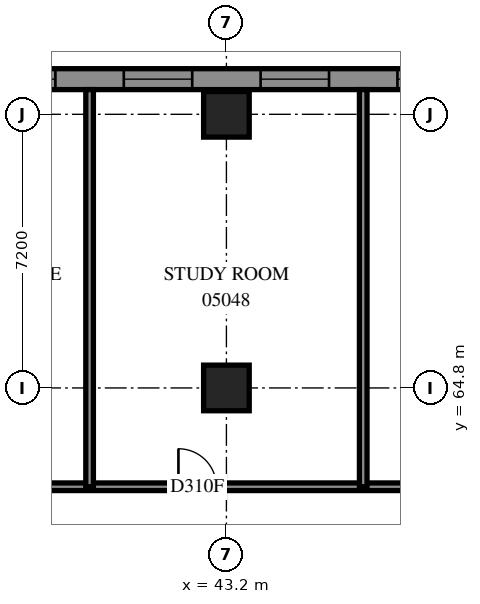
"""IFC4 building model, lengths in metres.
Left out: names, types, materials, properties, quantities, classifications, styles, units other than length and angle.
Written with IfcOpenShell. Run it as: python <this file> out.ifc"""

import sys

from ifc_helpers import new_model, si_unit, direction, frame, frame_2d, origin, origin_2d, place, context, subcontext, project, spatial, polyline, rectangle, outline, extrude, element, fill, save


model = new_model("IFC4")
c1 = context("Model", 3, precision=1e-05, world=origin(), true_north=direction((0.0, 1.0)))
c2 = subcontext(c1, "Body", "Model", "MODEL_VIEW")
j1 = project(units=[si_unit("LENGTHUNIT", "METRE"), si_unit("PLANEANGLEUNIT", "RADIAN")], contexts=[c1])
p1 = place(None, origin())
s1 = spatial("IfcSite", under=j1, at=p1, CompositionType="ELEMENT")
p2 = place(p1, origin())
s2 = spatial("IfcBuilding", under=s1, at=p2, CompositionType="ELEMENT")
p3 = place(p2, frame((0.0, 0.0, 22.8)))
s3 = spatial("IfcBuildingStorey", under=s2, at=p3, CompositionType="ELEMENT", Elevation=22.8)
for number, where, z_axis, x_axis in (
    (1, (43.2, 64.8, 0.0), (0.0, 0.0, 1.0), (1.0, 0.0, 0.0)),
    (2, (43.2, 72.0, 0.0), (0.0, 0.0, 1.0), (1.0, 0.0, 0.0)),
):
    element("IfcColumn", number, at=place(p3, frame(where, z_axis=z_axis, x_axis=x_axis)), inside=s3, PredefinedType="COLUMN", context=c2, shape_type="SweptSolid", body=[
        extrude(rectangle(XDim=1.2, YDim=1.2, at=origin_2d()), origin(), (0.0, 0.0, 1.0), 3.9),
    ])
p4 = place(p3, frame((79.583, 72.925, 0.0), z_axis=(0.0, 0.0, 1.0), x_axis=(-1.0, 0.0, 0.0)))
e3 = element("IfcWall", 3, at=p4, inside=s3, PredefinedType="SOLIDWALL", context=c2, shape_type="SweptSolid", body=[
    extrude(outline(polyline([(-0.114, -0.275), (79.583, -0.275), (79.033, 0.275), (0.114, 0.275), (-0.114, -0.275)])), origin(), (0.0, 0.0, 1.0), 3.9),
])
p5 = place(p4, frame((1.249, 0.0, 0.7)))
e4 = element("IfcOpeningElement", 4, at=p5, cuts=e3, PredefinedType="OPENING", context=c2, shape_type="SweptSolid", body=[
    extrude(rectangle(XDim=1.8, YDim=2.4, at=frame_2d((0.9, 1.2))), frame((0.0, 0.285, 0.0), z_axis=(0.0, -1.0, 0.0), x_axis=(1.0, 0.0, 0.0)), (0.0, 0.0, 1.0), 0.57),
])
p6 = place(p4, frame((4.883, 0.0, 0.7)))
e5 = element("IfcOpeningElement", 5, at=p6, cuts=e3, PredefinedType="OPENING", context=c2, shape_type="SweptSolid", body=[
    extrude(rectangle(XDim=1.8, YDim=2.4, at=frame_2d((0.9, 1.2))), frame((0.0, 0.285, 0.0), z_axis=(0.0, -1.0, 0.0), x_axis=(1.0, 0.0, 0.0)), (0.0, 0.0, 1.0), 0.57),
])
p7 = place(p4, frame((8.483, 0.0, 0.7)))
e6 = element("IfcOpeningElement", 6, at=p7, cuts=e3, PredefinedType="OPENING", context=c2, shape_type="SweptSolid", body=[
    extrude(rectangle(XDim=1.8, YDim=2.4, at=frame_2d((0.9, 1.2))), frame((0.0, 0.285, 0.0), z_axis=(0.0, -1.0, 0.0), x_axis=(1.0, 0.0, 0.0)), (0.0, 0.0, 1.0), 0.57),
])
p8 = place(p4, frame((12.083, 0.0, 0.7)))
e7 = element("IfcOpeningElement", 7, at=p8, cuts=e3, PredefinedType="OPENING", context=c2, shape_type="SweptSolid", body=[
    extrude(rectangle(XDim=1.8, YDim=2.4, at=frame_2d((0.9, 1.2))), frame((0.0, 0.285, 0.0), z_axis=(0.0, -1.0, 0.0), x_axis=(1.0, 0.0, 0.0)), (0.0, 0.0, 1.0), 0.57),
])
p9 = place(p4, frame((15.683, 0.0, 0.7)))
e8 = element("IfcOpeningElement", 8, at=p9, cuts=e3, PredefinedType="OPENING", context=c2, shape_type="SweptSolid", body=[
    extrude(rectangle(XDim=1.8, YDim=2.4, at=frame_2d((0.9, 1.2))), frame((0.0, 0.285, 0.0), z_axis=(0.0, -1.0, 0.0), x_axis=(1.0, 0.0, 0.0)), (0.0, 0.0, 1.0), 0.57),
])
p10 = place(p4, frame((19.283, 0.0, 0.7)))
e9 = element("IfcOpeningElement", 9, at=p10, cuts=e3, PredefinedType="OPENING", context=c2, shape_type="SweptSolid", body=[
    extrude(rectangle(XDim=1.8, YDim=2.4, at=frame_2d((0.9, 1.2))), frame((0.0, 0.285, 0.0), z_axis=(0.0, -1.0, 0.0), x_axis=(1.0, 0.0, 0.0)), (0.0, 0.0, 1.0), 0.57),
])
p11 = place(p4, frame((22.883, 0.0, 0.7)))
e10 = element("IfcOpeningElement", 10, at=p11, cuts=e3, PredefinedType="OPENING", context=c2, shape_type="SweptSolid", body=[
    extrude(rectangle(XDim=1.8, YDim=2.4, at=frame_2d((0.9, 1.2))), frame((0.0, 0.285, 0.0), z_axis=(0.0, -1.0, 0.0), x_axis=(1.0, 0.0, 0.0)), (0.0, 0.0, 1.0), 0.57),
])
p12 = place(p4, frame((26.483, 0.0, 0.7)))
e11 = element("IfcOpeningElement", 11, at=p12, cuts=e3, PredefinedType="OPENING", context=c2, shape_type="SweptSolid", body=[
    extrude(rectangle(XDim=1.8, YDim=2.4, at=frame_2d((0.9, 1.2))), frame((0.0, 0.285, 0.0), z_axis=(0.0, -1.0, 0.0), x_axis=(1.0, 0.0, 0.0)), (0.0, 0.0, 1.0), 0.57),
])
p13 = place(p4, frame((30.083, 0.0, 0.7)))
e12 = element("IfcOpeningElement", 12, at=p13, cuts=e3, PredefinedType="OPENING", context=c2, shape_type="SweptSolid", body=[
    extrude(rectangle(XDim=1.8, YDim=2.4, at=frame_2d((0.9, 1.2))), frame((0.0, 0.285, 0.0), z_axis=(0.0, -1.0, 0.0), x_axis=(1.0, 0.0, 0.0)), (0.0, 0.0, 1.0), 0.57),
])
p14 = place(p4, frame((33.683, 0.0, 0.7)))
e13 = element("IfcOpeningElement", 13, at=p14, cuts=e3, PredefinedType="OPENING", context=c2, shape_type="SweptSolid", body=[
    extrude(rectangle(XDim=1.8, YDim=2.4, at=frame_2d((0.9, 1.2))), frame((0.0, 0.285, 0.0), z_axis=(0.0, -1.0, 0.0), x_axis=(1.0, 0.0, 0.0)), (0.0, 0.0, 1.0), 0.57),
])
p15 = place(p4, frame((37.283, 0.0, 0.7)))
e14 = element("IfcOpeningElement", 14, at=p15, cuts=e3, PredefinedType="OPENING", context=c2, shape_type="SweptSolid", body=[
    extrude(rectangle(XDim=1.8, YDim=2.4, at=frame_2d((0.9, 1.2))), frame((0.0, 0.285, 0.0), z_axis=(0.0, -1.0, 0.0), x_axis=(1.0, 0.0, 0.0)), (0.0, 0.0, 1.0), 0.57),
])
p16 = place(p4, frame((40.883, 0.0, 0.7)))
e15 = element("IfcOpeningElement", 15, at=p16, cuts=e3, PredefinedType="OPENING", context=c2, shape_type="SweptSolid", body=[
    extrude(rectangle(XDim=1.8, YDim=2.4, at=frame_2d((0.9, 1.2))), frame((0.0, 0.285, 0.0), z_axis=(0.0, -1.0, 0.0), x_axis=(1.0, 0.0, 0.0)), (0.0, 0.0, 1.0), 0.57),
])
p17 = place(p4, frame((44.483, 0.0, 0.7)))
e16 = element("IfcOpeningElement", 16, at=p17, cuts=e3, PredefinedType="OPENING", context=c2, shape_type="SweptSolid", body=[
    extrude(rectangle(XDim=1.8, YDim=2.4, at=frame_2d((0.9, 1.2))), frame((0.0, 0.285, 0.0), z_axis=(0.0, -1.0, 0.0), x_axis=(1.0, 0.0, 0.0)), (0.0, 0.0, 1.0), 0.57),
])
p18 = place(p4, frame((48.083, 0.0, 0.7)))
e17 = element("IfcOpeningElement", 17, at=p18, cuts=e3, PredefinedType="OPENING", context=c2, shape_type="SweptSolid", body=[
    extrude(rectangle(XDim=1.8, YDim=2.4, at=frame_2d((0.9, 1.2))), frame((0.0, 0.285, 0.0), z_axis=(0.0, -1.0, 0.0), x_axis=(1.0, 0.0, 0.0)), (0.0, 0.0, 1.0), 0.57),
])
p19 = place(p4, frame((51.683, 0.0, 0.7)))
e18 = element("IfcOpeningElement", 18, at=p19, cuts=e3, PredefinedType="OPENING", context=c2, shape_type="SweptSolid", body=[
    extrude(rectangle(XDim=1.8, YDim=2.4, at=frame_2d((0.9, 1.2))), frame((0.0, 0.285, 0.0), z_axis=(0.0, -1.0, 0.0), x_axis=(1.0, 0.0, 0.0)), (0.0, 0.0, 1.0), 0.57),
])
p20 = place(p4, frame((55.283, 0.0, 0.7)))
e19 = element("IfcOpeningElement", 19, at=p20, cuts=e3, PredefinedType="OPENING", context=c2, shape_type="SweptSolid", body=[
    extrude(rectangle(XDim=1.8, YDim=2.4, at=frame_2d((0.9, 1.2))), frame((0.0, 0.285, 0.0), z_axis=(0.0, -1.0, 0.0), x_axis=(1.0, 0.0, 0.0)), (0.0, 0.0, 1.0), 0.57),
])
p21 = place(p4, frame((58.883, 0.0, 0.7)))
e20 = element("IfcOpeningElement", 20, at=p21, cuts=e3, PredefinedType="OPENING", context=c2, shape_type="SweptSolid", body=[
    extrude(rectangle(XDim=1.8, YDim=2.4, at=frame_2d((0.9, 1.2))), frame((0.0, 0.285, 0.0), z_axis=(0.0, -1.0, 0.0), x_axis=(1.0, 0.0, 0.0)), (0.0, 0.0, 1.0), 0.57),
])
p22 = place(p4, frame((62.483, 0.0, 0.7)))
e21 = element("IfcOpeningElement", 21, at=p22, cuts=e3, PredefinedType="OPENING", context=c2, shape_type="SweptSolid", body=[
    extrude(rectangle(XDim=1.8, YDim=2.4, at=frame_2d((0.9, 1.2))), frame((0.0, 0.285, 0.0), z_axis=(0.0, -1.0, 0.0), x_axis=(1.0, 0.0, 0.0)), (0.0, 0.0, 1.0), 0.57),
])
p23 = place(p4, frame((66.083, 0.0, 0.7)))
e22 = element("IfcOpeningElement", 22, at=p23, cuts=e3, PredefinedType="OPENING", context=c2, shape_type="SweptSolid", body=[
    extrude(rectangle(XDim=1.8, YDim=2.4, at=frame_2d((0.9, 1.2))), frame((0.0, 0.285, 0.0), z_axis=(0.0, -1.0, 0.0), x_axis=(1.0, 0.0, 0.0)), (0.0, 0.0, 1.0), 0.57),
])
p24 = place(p4, frame((69.683, 0.0, 0.7)))
e23 = element("IfcOpeningElement", 23, at=p24, cuts=e3, PredefinedType="OPENING", context=c2, shape_type="SweptSolid", body=[
    extrude(rectangle(XDim=1.8, YDim=2.4, at=frame_2d((0.9, 1.2))), frame((0.0, 0.285, 0.0), z_axis=(0.0, -1.0, 0.0), x_axis=(1.0, 0.0, 0.0)), (0.0, 0.0, 1.0), 0.57),
])
p25 = place(p4, frame((73.683, 0.0, 0.7)))
e24 = element("IfcOpeningElement", 24, at=p25, cuts=e3, PredefinedType="OPENING", context=c2, shape_type="SweptSolid", body=[
    extrude(rectangle(XDim=1.8, YDim=2.4, at=frame_2d((0.9, 1.2))), frame((0.0, 0.285, 0.0), z_axis=(0.0, -1.0, 0.0), x_axis=(1.0, 0.0, 0.0)), (0.0, 0.0, 1.0), 0.57),
])
p26 = place(p4, frame((76.508, 0.0, 0.7)))
e25 = element("IfcOpeningElement", 25, at=p26, cuts=e3, PredefinedType="OPENING", context=c2, shape_type="SweptSolid", body=[
    extrude(rectangle(XDim=1.8, YDim=2.4, at=frame_2d((0.9, 1.2))), frame((0.0, 0.285, 0.0), z_axis=(0.0, -1.0, 0.0), x_axis=(1.0, 0.0, 0.0)), (0.0, 0.0, 1.0), 0.57),
])
p27 = place(p3, frame((0.002, 62.2, 0.0), z_axis=(0.0, 0.0, 1.0), x_axis=(1.0, 0.0, 0.0)))
e26 = element("IfcWall", 26, at=p27, inside=s3, PredefinedType="PARTITIONING", context=c2, shape_type="SweptSolid", body=[
    extrude(rectangle(XDim=54.598, YDim=0.2, at=frame_2d((27.299, 0.0))), origin(), (0.0, 0.0, 1.0), 3.9),
])
p28 = place(p27, frame((8.667, 0.0, 0.0)))
e27 = element("IfcOpeningElement", 27, at=p28, cuts=e26, PredefinedType="OPENING", context=c2, shape_type="SweptSolid", body=[
    extrude(rectangle(XDim=1.0, YDim=2.1, at=frame_2d((0.5, 1.05))), frame((0.0, 0.11, 0.0), z_axis=(0.0, -1.0, 0.0), x_axis=(1.0, 0.0, 0.0)), (0.0, 0.0, 1.0), 0.22),
])
p29 = place(p27, frame((13.136, 0.0, 0.0)))
e28 = element("IfcOpeningElement", 28, at=p29, cuts=e26, PredefinedType="OPENING", context=c2, shape_type="SweptSolid", body=[
    extrude(rectangle(XDim=1.0, YDim=2.1, at=frame_2d((0.5, 1.05))), frame((0.0, 0.11, 0.0), z_axis=(0.0, -1.0, 0.0), x_axis=(1.0, 0.0, 0.0)), (0.0, 0.0, 1.0), 0.22),
])
p30 = place(p27, frame((20.335, 0.0, 0.0)))
e29 = element("IfcOpeningElement", 29, at=p30, cuts=e26, PredefinedType="OPENING", context=c2, shape_type="SweptSolid", body=[
    extrude(rectangle(XDim=1.0, YDim=2.1, at=frame_2d((0.5, 1.05))), frame((0.0, 0.11, 0.0), z_axis=(0.0, -1.0, 0.0), x_axis=(1.0, 0.0, 0.0)), (0.0, 0.0, 1.0), 0.22),
])
p31 = place(p27, frame((27.535, 0.0, 0.0)))
e30 = element("IfcOpeningElement", 30, at=p31, cuts=e26, PredefinedType="OPENING", context=c2, shape_type="SweptSolid", body=[
    extrude(rectangle(XDim=1.0, YDim=2.1, at=frame_2d((0.5, 1.05))), frame((0.0, 0.11, 0.0), z_axis=(0.0, -1.0, 0.0), x_axis=(1.0, 0.0, 0.0)), (0.0, 0.0, 1.0), 0.22),
])
p32 = place(p27, frame((34.736, 0.0, 0.0)))
e31 = element("IfcOpeningElement", 31, at=p32, cuts=e26, PredefinedType="OPENING", context=c2, shape_type="SweptSolid", body=[
    extrude(rectangle(XDim=1.0, YDim=2.1, at=frame_2d((0.5, 1.05))), frame((0.0, 0.11, 0.0), z_axis=(0.0, -1.0, 0.0), x_axis=(1.0, 0.0, 0.0)), (0.0, 0.0, 1.0), 0.22),
])
p33 = place(p27, frame((41.935, 0.0, 0.0)))
e32 = element("IfcOpeningElement", 32, at=p33, cuts=e26, PredefinedType="OPENING", context=c2, shape_type="SweptSolid", body=[
    extrude(rectangle(XDim=1.0, YDim=2.1, at=frame_2d((0.5, 1.05))), frame((0.0, 0.11, 0.0), z_axis=(0.0, -1.0, 0.0), x_axis=(1.0, 0.0, 0.0)), (0.0, 0.0, 1.0), 0.22),
])
p34 = place(p27, frame((49.136, 0.0, 0.0)))
e33 = element("IfcOpeningElement", 33, at=p34, cuts=e26, PredefinedType="OPENING", context=c2, shape_type="SweptSolid", body=[
    extrude(rectangle(XDim=1.0, YDim=2.1, at=frame_2d((0.5, 1.05))), frame((0.0, 0.11, 0.0), z_axis=(0.0, -1.0, 0.0), x_axis=(1.0, 0.0, 0.0)), (0.0, 0.0, 1.0), 0.22),
])
p35 = place(p27, frame((4.803, 0.0, 0.0)))
e34 = element("IfcOpeningElement", 34, at=p35, cuts=e26, PredefinedType="OPENING", context=c2, shape_type="SweptSolid", body=[
    extrude(rectangle(XDim=1.0, YDim=2.1, at=frame_2d((0.5, 1.05))), frame((0.0, 0.11, 0.0), z_axis=(0.0, -1.0, 0.0), x_axis=(1.0, 0.0, 0.0)), (0.0, 0.0, 1.0), 0.22),
])
for number, where, z_axis, x_axis in (
    (35, (39.6, 62.2, 0.0), (0.0, 0.0, 1.0), (0.0, 1.0, 0.0)),
    (36, (46.8, 62.2, 0.0), (0.0, 0.0, 1.0), (0.0, 1.0, 0.0)),
):
    element("IfcWall", number, at=place(p3, frame(where, z_axis=z_axis, x_axis=x_axis)), inside=s3, PredefinedType="PARTITIONING", context=c2, shape_type="SweptSolid", body=[
        extrude(rectangle(XDim=10.45, YDim=0.2, at=frame_2d((5.225, 0.0))), origin(), (0.0, 0.0, 1.0), 3.9),
    ])
p36 = place(p13, origin())
e37 = element("IfcWindow", 37, at=p36, inside=s3, PartitioningType="SINGLE_PANEL", PredefinedType="WINDOW", context=c2, shape_type="SweptSolid", body=[
    extrude(rectangle(XDim=1.8, YDim=2.4, at=frame_2d((0.9, 1.2))), frame((0.0, 0.155, 0.0), z_axis=(0.0, -1.0, 0.0), x_axis=(1.0, 0.0, 0.0)), (0.0, 0.0, 1.0), 0.06),
])
fill(e12, e37)
p37 = place(p14, origin())
e38 = element("IfcWindow", 38, at=p37, inside=s3, PartitioningType="SINGLE_PANEL", PredefinedType="WINDOW", context=c2, shape_type="SweptSolid", body=[
    extrude(rectangle(XDim=1.8, YDim=2.4, at=frame_2d((0.9, 1.2))), frame((0.0, 0.155, 0.0), z_axis=(0.0, -1.0, 0.0), x_axis=(1.0, 0.0, 0.0)), (0.0, 0.0, 1.0), 0.06),
])
fill(e13, e38)
p38 = place(p15, origin())
e39 = element("IfcWindow", 39, at=p38, inside=s3, PartitioningType="SINGLE_PANEL", PredefinedType="WINDOW", context=c2, shape_type="SweptSolid", body=[
    extrude(rectangle(XDim=1.8, YDim=2.4, at=frame_2d((0.9, 1.2))), frame((0.0, 0.155, 0.0), z_axis=(0.0, -1.0, 0.0), x_axis=(1.0, 0.0, 0.0)), (0.0, 0.0, 1.0), 0.06),
])
fill(e14, e39)
p39 = place(p16, origin())
e40 = element("IfcWindow", 40, at=p39, inside=s3, PartitioningType="SINGLE_PANEL", PredefinedType="WINDOW", context=c2, shape_type="SweptSolid", body=[
    extrude(rectangle(XDim=1.8, YDim=2.4, at=frame_2d((0.9, 1.2))), frame((0.0, 0.155, 0.0), z_axis=(0.0, -1.0, 0.0), x_axis=(1.0, 0.0, 0.0)), (0.0, 0.0, 1.0), 0.06),
])
fill(e15, e40)
p40 = place(p33, origin())
e41 = element("IfcDoor", 41, at=p40, inside=s3, OperationType="SINGLE_SWING_LEFT", PredefinedType="DOOR", context=c2, shape_type="SweptSolid", body=[
    extrude(rectangle(XDim=1.0, YDim=2.1, at=frame_2d((0.5, 1.05))), frame((0.0, 0.025, 0.0), z_axis=(0.0, -1.0, 0.0), x_axis=(1.0, 0.0, 0.0)), (0.0, 0.0, 1.0), 0.05),
])
fill(e32, e41)
save(model, sys.argv[1])
